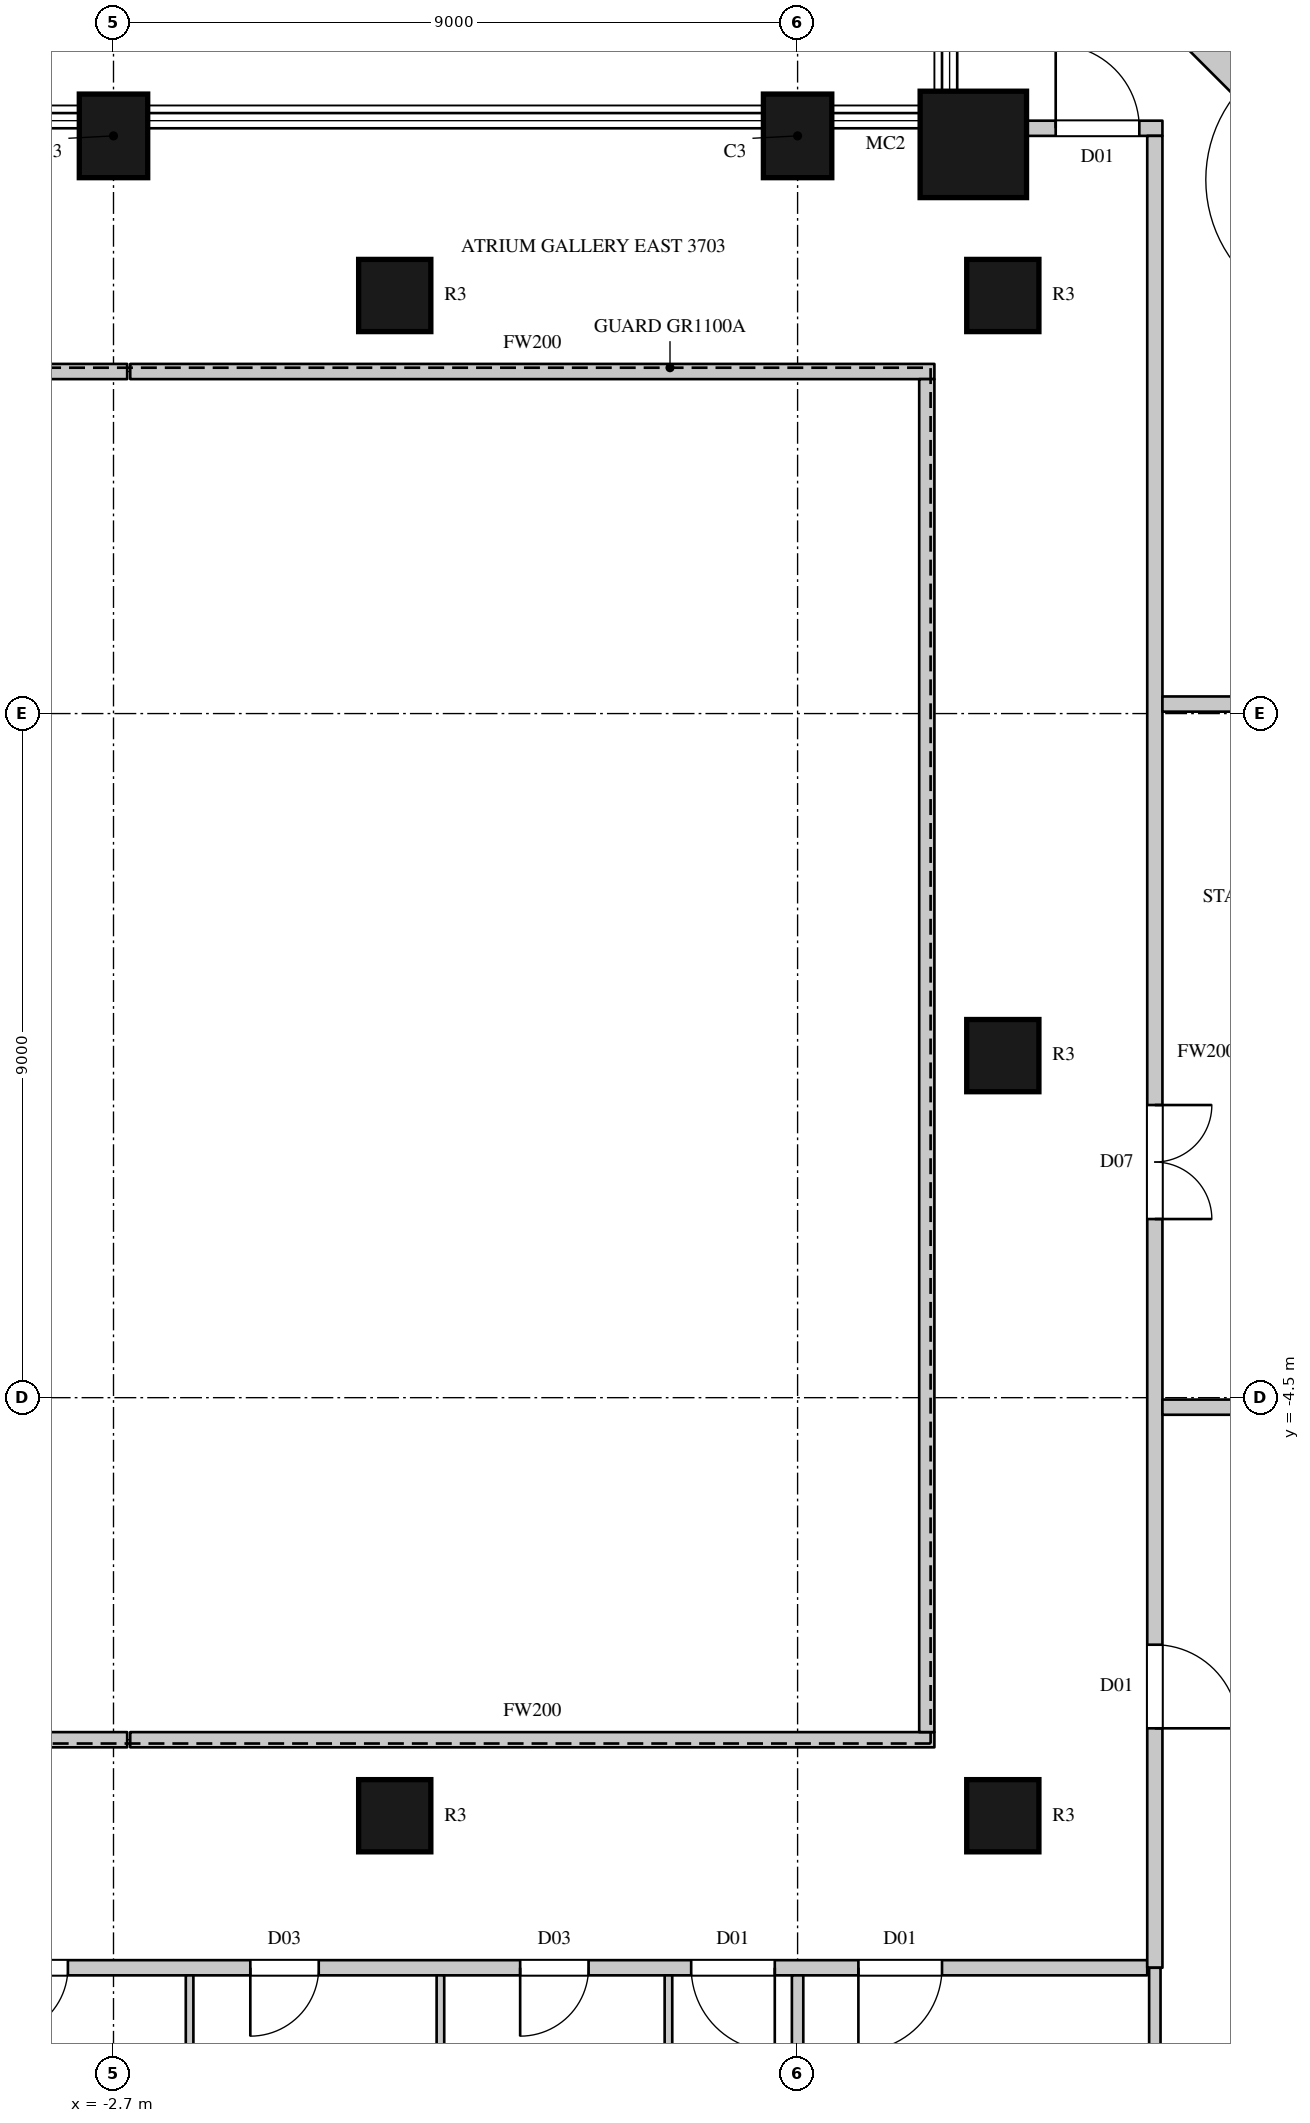
"""IFC4 building model, lengths in metres.
Left out: names, types, materials, properties, quantities, classifications, styles, units other than length and angle.
Written with IfcOpenShell. Run it as: python <this file> out.ifc"""

import sys

from ifc_helpers import new_model, si_unit, direction, frame, frame_2d, origin, origin_2d, place, context, subcontext, project, spatial, rectangle, circle, extrude, element, fill, save


model = new_model("IFC4")
c1 = context("Model", 3, precision=1e-05, world=origin(), true_north=direction((0.0, 1.0)))
c2 = subcontext(c1, "Body", "Model", "MODEL_VIEW")
j1 = project(units=[si_unit("LENGTHUNIT", "METRE"), si_unit("PLANEANGLEUNIT", "RADIAN")], contexts=[c1])
p1 = place(None, origin())
s1 = spatial("IfcSite", under=j1, at=p1, CompositionType="ELEMENT")
p2 = place(p1, origin())
s2 = spatial("IfcBuilding", under=s1, at=p2, CompositionType="ELEMENT")
p3 = place(p2, frame((0.0, 0.0, 172.8)))
s3 = spatial("IfcBuildingStorey", under=s2, at=p3, CompositionType="ELEMENT", Elevation=172.8)
p4 = place(p3, frame((8.612, 11.988, 0.0), z_axis=(0.0, 0.0, 1.0), x_axis=(1.0, 0.0, 0.0)))
e1 = element("IfcColumn", 1, at=p4, inside=s3, PredefinedType="COLUMN", context=c2, shape_type="SweptSolid", body=[
    extrude(circle(Radius=0.7, at=origin_2d()), origin(), (0.0, 0.0, 1.0), 4.1),
])
for number, where, z_axis, x_axis in (
    (2, (6.3, 12.1, 0.0), (0.0, 0.0, 1.0), (-1.0, 0.0, 0.0)),
    (3, (-2.7, 12.1, 0.0), (0.0, 0.0, 1.0), (-1.0, 0.0, 0.0)),
):
    element("IfcColumn", number, at=place(p3, frame(where, z_axis=z_axis, x_axis=x_axis)), inside=s3, PredefinedType="COLUMN", context=c2, shape_type="SweptSolid", body=[
        extrude(rectangle(XDim=0.9, YDim=1.1, at=origin_2d()), origin(), (0.0, 0.0, 1.0), 4.1),
    ])
for number, where, z_axis, x_axis in (
    (4, (1.0, -10.0, 0.0), (0.0, 0.0, 1.0), (1.0, 0.0, 0.0)),
    (5, (1.0, 10.0, 0.0), (0.0, 0.0, 1.0), (1.0, 0.0, 0.0)),
    (6, (9.0, -10.0, 0.0), (0.0, 0.0, 1.0), (1.0, 0.0, 0.0)),
    (7, (9.0, 0.0, 0.0), (0.0, 0.0, 1.0), (1.0, 0.0, 0.0)),
    (8, (9.0, 10.0, 0.0), (0.0, 0.0, 1.0), (1.0, 0.0, 0.0)),
):
    element("IfcColumn", number, at=place(p3, frame(where, z_axis=z_axis, x_axis=x_axis)), inside=s3, PredefinedType="COLUMN", context=c2, shape_type="SweptSolid", body=[
        extrude(circle(Radius=0.475, at=origin_2d()), origin(), (0.0, 0.0, 1.0), 4.1),
    ])
p5 = place(p3, frame((13.941, 11.053, 0.0), z_axis=(0.0, 0.0, 1.0), x_axis=(-0.707106781187, 0.707106781187, 0.0)))
e9 = element("IfcWall", 9, at=p5, inside=s3, PredefinedType="SOLIDWALL", context=c2, shape_type="SweptSolid", body=[
    extrude(rectangle(XDim=6.505, YDim=0.45, at=frame_2d((3.252, 0.0))), origin(), (0.0, 0.0, 1.0), 3.8),
])
p6 = place(p5, frame((0.665, 0.0, 0.0)))
e10 = element("IfcOpeningElement", 10, at=p6, cuts=e9, PredefinedType="OPENING", context=c2, shape_type="SweptSolid", body=[
    extrude(rectangle(XDim=1.8, YDim=2.4, at=frame_2d((0.9, 1.2))), frame((0.0, 0.235, 0.0), z_axis=(0.0, -1.0, 0.0), x_axis=(1.0, 0.0, 0.0)), (0.0, 0.0, 1.0), 0.47),
])
p7 = place(p3, frame((-10.9, -12.0, 0.0), z_axis=(0.0, 0.0, 1.0), x_axis=(1.0, 0.0, 0.0)))
e11 = element("IfcWall", 11, at=p7, inside=s3, PredefinedType="PARTITIONING", context=c2, shape_type="SweptSolid", body=[
    extrude(rectangle(XDim=21.8, YDim=0.2, at=frame_2d((10.9, 0.0))), origin(), (0.0, 0.0, 1.0), 3.8),
])
p8 = place(p7, frame((0.95, 0.0, 0.0)))
e12 = element("IfcOpeningElement", 12, at=p8, cuts=e11, PredefinedType="OPENING", context=c2, shape_type="SweptSolid", body=[
    extrude(rectangle(XDim=0.9, YDim=2.2, at=frame_2d((0.45, 1.1))), frame((0.0, 0.11, 0.0), z_axis=(0.0, -1.0, 0.0), x_axis=(1.0, 0.0, 0.0)), (0.0, 0.0, 1.0), 0.22),
])
p9 = place(p7, frame((3.95, 0.0, 0.0)))
e13 = element("IfcOpeningElement", 13, at=p9, cuts=e11, PredefinedType="OPENING", context=c2, shape_type="SweptSolid", body=[
    extrude(rectangle(XDim=0.9, YDim=2.2, at=frame_2d((0.45, 1.1))), frame((0.0, 0.11, 0.0), z_axis=(0.0, -1.0, 0.0), x_axis=(1.0, 0.0, 0.0)), (0.0, 0.0, 1.0), 0.22),
])
p10 = place(p7, frame((6.7, 0.0, 0.0)))
e14 = element("IfcOpeningElement", 14, at=p10, cuts=e11, PredefinedType="OPENING", context=c2, shape_type="SweptSolid", body=[
    extrude(rectangle(XDim=0.9, YDim=2.2, at=frame_2d((0.45, 1.1))), frame((0.0, 0.11, 0.0), z_axis=(0.0, -1.0, 0.0), x_axis=(1.0, 0.0, 0.0)), (0.0, 0.0, 1.0), 0.22),
])
p11 = place(p7, frame((10.0, 0.0, 0.0)))
e15 = element("IfcOpeningElement", 15, at=p11, cuts=e11, PredefinedType="OPENING", context=c2, shape_type="SweptSolid", body=[
    extrude(rectangle(XDim=0.9, YDim=2.2, at=frame_2d((0.45, 1.1))), frame((0.0, 0.11, 0.0), z_axis=(0.0, -1.0, 0.0), x_axis=(1.0, 0.0, 0.0)), (0.0, 0.0, 1.0), 0.22),
])
p12 = place(p7, frame((13.55, 0.0, 0.0)))
e16 = element("IfcOpeningElement", 16, at=p12, cuts=e11, PredefinedType="OPENING", context=c2, shape_type="SweptSolid", body=[
    extrude(rectangle(XDim=0.9, YDim=2.2, at=frame_2d((0.45, 1.1))), frame((0.0, 0.11, 0.0), z_axis=(0.0, -1.0, 0.0), x_axis=(1.0, 0.0, 0.0)), (0.0, 0.0, 1.0), 0.22),
])
p13 = place(p7, frame((15.8, 0.0, 0.0)))
e17 = element("IfcOpeningElement", 17, at=p13, cuts=e11, PredefinedType="OPENING", context=c2, shape_type="SweptSolid", body=[
    extrude(rectangle(XDim=1.1, YDim=2.4, at=frame_2d((0.55, 1.2))), frame((0.0, 0.11, 0.0), z_axis=(0.0, -1.0, 0.0), x_axis=(1.0, 0.0, 0.0)), (0.0, 0.0, 1.0), 0.22),
])
p14 = place(p7, frame((18.0, 0.0, 0.0)))
e18 = element("IfcOpeningElement", 18, at=p14, cuts=e11, PredefinedType="OPENING", context=c2, shape_type="SweptSolid", body=[
    extrude(rectangle(XDim=1.1, YDim=2.4, at=frame_2d((0.55, 1.2))), frame((0.0, 0.11, 0.0), z_axis=(0.0, -1.0, 0.0), x_axis=(1.0, 0.0, 0.0)), (0.0, 0.0, 1.0), 0.22),
])
for number, where, z_axis, x_axis in (
    (19, (-6.1, -9.0, 0.0), (0.0, 0.0, 1.0), (1.0, 0.0, 0.0)),
    (20, (-6.1, 9.0, 0.0), (0.0, 0.0, 1.0), (1.0, 0.0, 0.0)),
):
    element("IfcWall", number, at=place(p3, frame(where, z_axis=z_axis, x_axis=x_axis)), inside=s3, PredefinedType="PARTITIONING", context=c2, shape_type="SweptSolid", body=[
        extrude(rectangle(XDim=3.58, YDim=0.2, at=frame_2d((1.79, 0.0))), origin(), (0.0, 0.0, 1.0), 3.8),
    ])
for number, where, z_axis, x_axis in (
    (21, (-2.48, -9.0, 0.0), (0.0, 0.0, 1.0), (1.0, 0.0, 0.0)),
    (22, (-2.48, 9.0, 0.0), (0.0, 0.0, 1.0), (1.0, 0.0, 0.0)),
):
    element("IfcWall", number, at=place(p3, frame(where, z_axis=z_axis, x_axis=x_axis)), inside=s3, PredefinedType="PARTITIONING", context=c2, shape_type="SweptSolid", body=[
        extrude(rectangle(XDim=10.58, YDim=0.2, at=frame_2d((5.29, 0.0))), origin(), (0.0, 0.0, 1.0), 3.8),
    ])
p15 = place(p3, frame((8.0, -8.9, 0.0), z_axis=(0.0, 0.0, 1.0), x_axis=(0.0, 1.0, 0.0)))
e23 = element("IfcWall", 23, at=p15, inside=s3, PredefinedType="PARTITIONING", context=c2, shape_type="SweptSolid", body=[
    extrude(rectangle(XDim=17.8, YDim=0.2, at=frame_2d((8.9, 0.0))), origin(), (0.0, 0.0, 1.0), 3.8),
])
p16 = place(p3, frame((9.296, 12.2, 0.0), z_axis=(0.0, 0.0, 1.0), x_axis=(1.0, 0.0, 0.0)))
e24 = element("IfcWall", 24, at=p16, inside=s3, PredefinedType="PARTITIONING", context=c2, shape_type="SweptSolid", body=[
    extrude(rectangle(XDim=1.804, YDim=0.2, at=frame_2d((0.902, 0.0))), origin(), (0.0, 0.0, 1.0), 3.8),
])
p17 = place(p16, frame((0.4, 0.0, 0.0)))
e25 = element("IfcOpeningElement", 25, at=p17, cuts=e24, PredefinedType="OPENING", context=c2, shape_type="SweptSolid", body=[
    extrude(rectangle(XDim=1.1, YDim=2.4, at=frame_2d((0.55, 1.2))), frame((0.0, 0.11, 0.0), z_axis=(0.0, -1.0, 0.0), x_axis=(1.0, 0.0, 0.0)), (0.0, 0.0, 1.0), 0.22),
])
p18 = place(p3, frame((11.0, -12.0, 0.0), z_axis=(0.0, 0.0, 1.0), x_axis=(0.0, 1.0, 0.0)))
e26 = element("IfcWall", 26, at=p18, inside=s3, PredefinedType="PARTITIONING", context=c2, shape_type="SweptSolid", body=[
    extrude(rectangle(XDim=24.1, YDim=0.2, at=frame_2d((12.05, 0.0))), origin(), (0.0, 0.0, 1.0), 3.8),
])
p19 = place(p18, frame((9.85, 0.0, 0.0)))
e27 = element("IfcOpeningElement", 27, at=p19, cuts=e26, PredefinedType="OPENING", context=c2, shape_type="SweptSolid", body=[
    extrude(rectangle(XDim=1.5, YDim=2.4, at=frame_2d((0.75, 1.2))), frame((0.0, 0.11, 0.0), z_axis=(0.0, -1.0, 0.0), x_axis=(1.0, 0.0, 0.0)), (0.0, 0.0, 1.0), 0.22),
])
p20 = place(p18, frame((3.15, 0.0, 0.0)))
e28 = element("IfcOpeningElement", 28, at=p20, cuts=e26, PredefinedType="OPENING", context=c2, shape_type="SweptSolid", body=[
    extrude(rectangle(XDim=1.1, YDim=2.4, at=frame_2d((0.55, 1.2))), frame((0.0, 0.11, 0.0), z_axis=(0.0, -1.0, 0.0), x_axis=(1.0, 0.0, 0.0)), (0.0, 0.0, 1.0), 0.22),
])
for number, where, z_axis, x_axis in (
    (29, (11.1, -4.625, 0.0), (0.0, 0.0, 1.0), (1.0, 0.0, 0.0)),
    (30, (11.1, 4.625, 0.0), (0.0, 0.0, 1.0), (1.0, 0.0, 0.0)),
):
    element("IfcWall", number, at=place(p3, frame(where, z_axis=z_axis, x_axis=x_axis)), inside=s3, PredefinedType="PARTITIONING", context=c2, shape_type="SweptSolid", body=[
        extrude(rectangle(XDim=3.575, YDim=0.2, at=frame_2d((1.788, 0.0))), origin(), (0.0, 0.0, 1.0), 3.8),
    ])
p21 = place(p3, frame((6.3, -16.05, 0.0), z_axis=(0.0, 0.0, 1.0), x_axis=(0.0, 1.0, 0.0)))
e31 = element("IfcWall", 31, at=p21, inside=s3, PredefinedType="PARTITIONING", context=c2, shape_type="SweptSolid", body=[
    extrude(rectangle(XDim=3.95, YDim=0.15, at=frame_2d((1.975, 0.0))), origin(), (0.0, 0.0, 1.0), 3.25),
])
p22 = place(p3, frame((11.0, -16.7, 0.0), z_axis=(0.0, 0.0, 1.0), x_axis=(0.0, 1.0, 0.0)))
e32 = element("IfcWall", 32, at=p22, inside=s3, PredefinedType="PARTITIONING", context=c2, shape_type="SweptSolid", body=[
    extrude(rectangle(XDim=4.7, YDim=0.15, at=frame_2d((2.35, 0.0))), origin(), (0.0, 0.0, 1.0), 3.8),
])
p23 = place(p3, frame((-1.699, -16.7, 0.0), z_axis=(0.0, 0.0, 1.0), x_axis=(0.0, 1.0, 0.0)))
e33 = element("IfcWall", 33, at=p23, inside=s3, PredefinedType="PARTITIONING", context=c2, shape_type="SweptSolid", body=[
    extrude(rectangle(XDim=4.6, YDim=0.1, at=frame_2d((2.3, 0.0))), origin(), (0.0, 0.0, 1.0), 3.8),
])
p24 = place(p3, frame((1.601, -16.7, 0.0), z_axis=(0.0, 0.0, 1.0), x_axis=(0.0, 1.0, 0.0)))
e34 = element("IfcWall", 34, at=p24, inside=s3, PredefinedType="PARTITIONING", context=c2, shape_type="SweptSolid", body=[
    extrude(rectangle(XDim=4.6, YDim=0.1, at=frame_2d((2.3, 0.0))), origin(), (0.0, 0.0, 1.0), 3.15),
])
p25 = place(p3, frame((4.601, -16.7, 0.0), z_axis=(0.0, 0.0, 1.0), x_axis=(0.0, 1.0, 0.0)))
e35 = element("IfcWall", 35, at=p25, inside=s3, PredefinedType="PARTITIONING", context=c2, shape_type="SweptSolid", body=[
    extrude(rectangle(XDim=4.6, YDim=0.1, at=frame_2d((2.3, 0.0))), origin(), (0.0, 0.0, 1.0), 3.8),
])
p26 = place(p19, origin())
e36 = element("IfcDoor", 36, at=p26, inside=s3, OperationType="DOUBLE_DOOR_SINGLE_SWING", PredefinedType="DOOR", context=c2, shape_type="SweptSolid", body=[
    extrude(rectangle(XDim=1.5, YDim=2.4, at=frame_2d((0.75, 1.2))), frame((0.0, 0.025, 0.0), z_axis=(0.0, -1.0, 0.0), x_axis=(1.0, 0.0, 0.0)), (0.0, 0.0, 1.0), 0.05),
])
fill(e27, e36)
p27 = place(p10, origin())
e37 = element("IfcDoor", 37, at=p27, inside=s3, OperationType="SINGLE_SWING_RIGHT", PredefinedType="DOOR", context=c2, shape_type="SweptSolid", body=[
    extrude(rectangle(XDim=0.9, YDim=2.2, at=frame_2d((0.45, 1.1))), frame((0.0, 0.025, 0.0), z_axis=(0.0, -1.0, 0.0), x_axis=(1.0, 0.0, 0.0)), (0.0, 0.0, 1.0), 0.05),
])
fill(e14, e37)
p28 = place(p11, origin())
e38 = element("IfcDoor", 38, at=p28, inside=s3, OperationType="SINGLE_SWING_RIGHT", PredefinedType="DOOR", context=c2, shape_type="SweptSolid", body=[
    extrude(rectangle(XDim=0.9, YDim=2.2, at=frame_2d((0.45, 1.1))), frame((0.0, 0.025, 0.0), z_axis=(0.0, -1.0, 0.0), x_axis=(1.0, 0.0, 0.0)), (0.0, 0.0, 1.0), 0.05),
])
fill(e15, e38)
p29 = place(p12, origin())
e39 = element("IfcDoor", 39, at=p29, inside=s3, OperationType="SINGLE_SWING_RIGHT", PredefinedType="DOOR", context=c2, shape_type="SweptSolid", body=[
    extrude(rectangle(XDim=0.9, YDim=2.2, at=frame_2d((0.45, 1.1))), frame((0.0, 0.025, 0.0), z_axis=(0.0, -1.0, 0.0), x_axis=(1.0, 0.0, 0.0)), (0.0, 0.0, 1.0), 0.05),
])
fill(e16, e39)
p30 = place(p13, origin())
e40 = element("IfcDoor", 40, at=p30, inside=s3, OperationType="SINGLE_SWING_LEFT", PredefinedType="DOOR", context=c2, shape_type="SweptSolid", body=[
    extrude(rectangle(XDim=1.1, YDim=2.4, at=frame_2d((0.55, 1.2))), frame((0.0, 0.025, 0.0), z_axis=(0.0, -1.0, 0.0), x_axis=(1.0, 0.0, 0.0)), (0.0, 0.0, 1.0), 0.05),
])
fill(e17, e40)
p31 = place(p14, origin())
e41 = element("IfcDoor", 41, at=p31, inside=s3, OperationType="SINGLE_SWING_RIGHT", PredefinedType="DOOR", context=c2, shape_type="SweptSolid", body=[
    extrude(rectangle(XDim=1.1, YDim=2.4, at=frame_2d((0.55, 1.2))), frame((0.0, 0.025, 0.0), z_axis=(0.0, -1.0, 0.0), x_axis=(1.0, 0.0, 0.0)), (0.0, 0.0, 1.0), 0.05),
])
fill(e18, e41)
p32 = place(p17, origin())
e42 = element("IfcDoor", 42, at=p32, inside=s3, OperationType="SINGLE_SWING_LEFT", PredefinedType="DOOR", context=c2, shape_type="SweptSolid", body=[
    extrude(rectangle(XDim=1.1, YDim=2.4, at=frame_2d((0.55, 1.2))), frame((0.0, 0.025, 0.0), z_axis=(0.0, -1.0, 0.0), x_axis=(1.0, 0.0, 0.0)), (0.0, 0.0, 1.0), 0.05),
])
fill(e25, e42)
p33 = place(p20, origin())
e43 = element("IfcDoor", 43, at=p33, inside=s3, OperationType="SINGLE_SWING_RIGHT", PredefinedType="DOOR", context=c2, shape_type="SweptSolid", body=[
    extrude(rectangle(XDim=1.1, YDim=2.4, at=frame_2d((0.55, 1.2))), frame((0.0, 0.025, 0.0), z_axis=(0.0, -1.0, 0.0), x_axis=(1.0, 0.0, 0.0)), (0.0, 0.0, 1.0), 0.05),
])
fill(e28, e43)
save(model, sys.argv[1])
